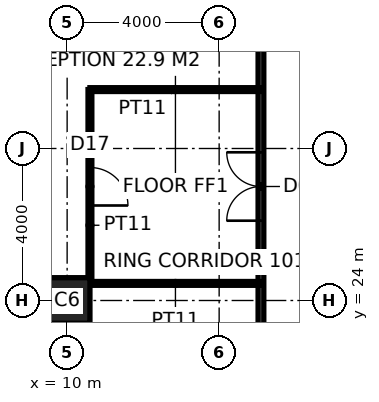
"""IFC4 building model, lengths in metres.
Left out: names, types, materials, properties, quantities, classifications, styles, units other than length and angle.
Written with IfcOpenShell. Run it as: python <this file> out.ifc"""

import sys

from ifc_helpers import new_model, si_unit, direction, frame, frame_2d, origin, origin_2d, place, context, subcontext, project, spatial, rectangle, hollow_rectangle, extrude, element, fill, save


model = new_model("IFC4")
c1 = context("Model", 3, precision=1e-05, world=origin(), true_north=direction((0.0, 1.0)))
c2 = subcontext(c1, "Body", "Model", "MODEL_VIEW")
j1 = project(units=[si_unit("LENGTHUNIT", "METRE"), si_unit("PLANEANGLEUNIT", "RADIAN")], contexts=[c1])
p1 = place(None, origin())
s1 = spatial("IfcSite", under=j1, at=p1, CompositionType="ELEMENT")
p2 = place(p1, origin())
s2 = spatial("IfcBuilding", under=s1, at=p2, CompositionType="ELEMENT")
p3 = place(p2, frame((0.0, 0.0, 6.0)))
s3 = spatial("IfcBuildingStorey", under=s2, at=p3, CompositionType="ELEMENT", Elevation=6.0)
p4 = place(p3, frame((10.0, 24.0, 0.0), z_axis=(0.0, 0.0, 1.0), x_axis=(1.0, 0.0, 0.0)))
e1 = element("IfcColumn", 1, at=p4, inside=s3, PredefinedType="COLUMN", context=c2, shape_type="SweptSolid", body=[
    extrude(hollow_rectangle(XDim=1.2, YDim=1.2, WallThickness=0.125, at=origin_2d()), origin(), (0.0, 0.0, 1.0), 5.0),
])
p5 = place(p3, frame((15.1, 15.225, 0.0), z_axis=(0.0, 0.0, 1.0), x_axis=(0.0, 1.0, 0.0)))
e2 = element("IfcWall", 2, at=p5, inside=s3, PredefinedType="PARTITIONING", context=c2, shape_type="SweptSolid", body=[
    extrude(rectangle(XDim=23.55, YDim=0.15, at=frame_2d((11.775, 0.0))), origin(), (0.0, 0.0, 1.0), 4.85),
])
p6 = place(p5, frame((10.875, 0.0, 0.0)))
e3 = element("IfcOpeningElement", 3, at=p6, cuts=e2, PredefinedType="OPENING", context=c2, shape_type="SweptSolid", body=[
    extrude(rectangle(XDim=1.8, YDim=2.4, at=frame_2d((0.9, 1.2))), frame((0.0, 0.085, 0.0), z_axis=(0.0, -1.0, 0.0), x_axis=(1.0, 0.0, 0.0)), (0.0, 0.0, 1.0), 0.17),
])
p7 = place(p3, frame((15.1, 29.55, 0.0), z_axis=(0.0, 0.0, 1.0), x_axis=(-1.0, 0.0, 0.0)))
e4 = element("IfcWall", 4, at=p7, inside=s3, PredefinedType="PARTITIONING", context=c2, shape_type="SweptSolid", body=[
    extrude(rectangle(XDim=4.5, YDim=0.1, at=frame_2d((2.25, 0.0))), origin(), (0.0, 0.0, 1.0), 4.85),
])
p8 = place(p3, frame((10.6, 29.55, 0.0), z_axis=(0.0, 0.0, 1.0), x_axis=(0.0, -1.0, 0.0)))
e5 = element("IfcWall", 5, at=p8, inside=s3, PredefinedType="PARTITIONING", context=c2, shape_type="SweptSolid", body=[
    extrude(rectangle(XDim=5.1, YDim=0.1, at=frame_2d((2.55, 0.0))), origin(), (0.0, 0.0, 1.0), 4.85),
])
p9 = place(p8, frame((2.05, 0.0, 0.0)))
e6 = element("IfcOpeningElement", 6, at=p9, cuts=e5, PredefinedType="OPENING", context=c2, shape_type="SweptSolid", body=[
    extrude(rectangle(XDim=1.0, YDim=2.2, at=frame_2d((0.5, 1.1))), frame((0.0, 0.06, 0.0), z_axis=(0.0, -1.0, 0.0), x_axis=(1.0, 0.0, 0.0)), (0.0, 0.0, 1.0), 0.12),
])
p10 = place(p3, frame((10.6, 24.45, 0.0), z_axis=(0.0, 0.0, 1.0), x_axis=(1.0, 0.0, 0.0)))
e7 = element("IfcWall", 7, at=p10, inside=s3, PredefinedType="PARTITIONING", context=c2, shape_type="SweptSolid", body=[
    extrude(rectangle(XDim=4.5, YDim=0.1, at=frame_2d((2.25, 0.0))), origin(), (0.0, 0.0, 1.0), 3.65),
])
p11 = place(p6, origin())
e8 = element("IfcDoor", 8, at=p11, inside=s3, OperationType="DOUBLE_DOOR_DOUBLE_SWING", PredefinedType="DOOR", context=c2, shape_type="SweptSolid", body=[
    extrude(rectangle(XDim=1.8, YDim=2.4, at=frame_2d((0.9, 1.2))), frame((0.0, 0.025, 0.0), z_axis=(0.0, -1.0, 0.0), x_axis=(1.0, 0.0, 0.0)), (0.0, 0.0, 1.0), 0.05),
])
fill(e3, e8)
p12 = place(p9, origin())
e9 = element("IfcDoor", 9, at=p12, inside=s3, OperationType="SINGLE_SWING_RIGHT", PredefinedType="DOOR", context=c2, shape_type="SweptSolid", body=[
    extrude(rectangle(XDim=1.0, YDim=2.2, at=frame_2d((0.5, 1.1))), frame((0.0, 0.025, 0.0), z_axis=(0.0, -1.0, 0.0), x_axis=(1.0, 0.0, 0.0)), (0.0, 0.0, 1.0), 0.05),
])
fill(e6, e9)
save(model, sys.argv[1])
